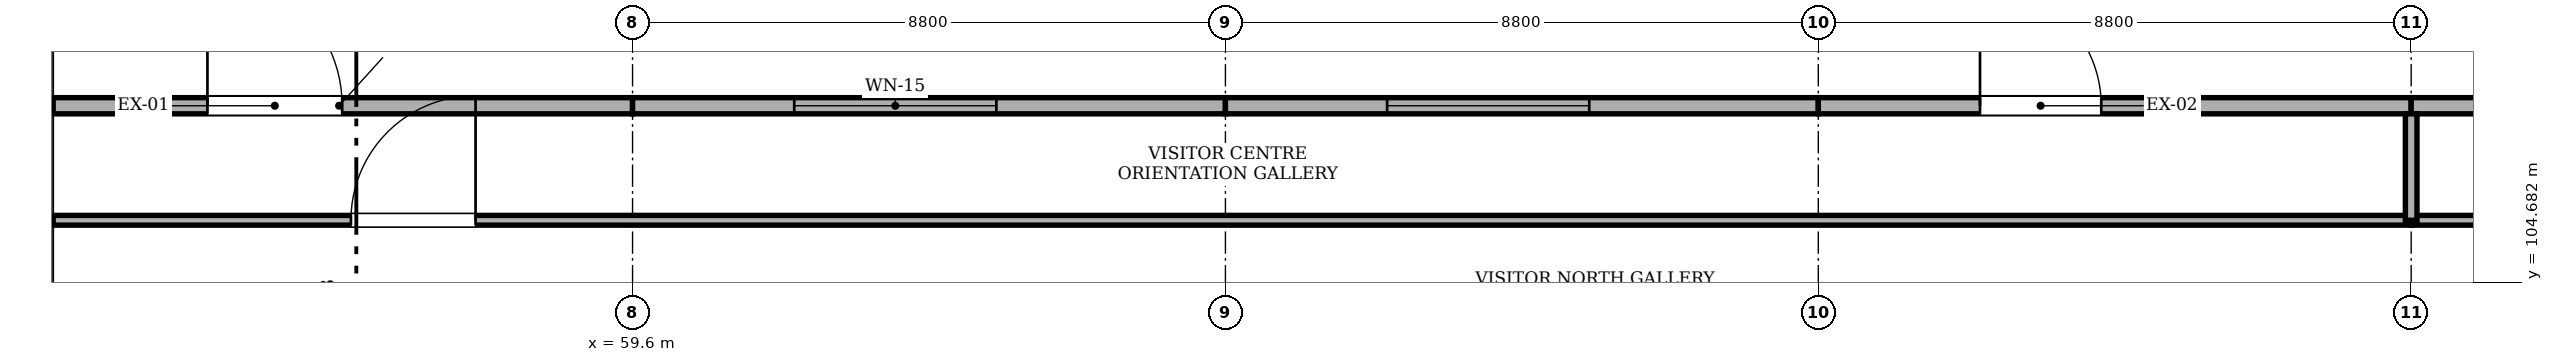
"""IFC4 building model, lengths in metres.
Left out: names, types, materials, properties, quantities, classifications, styles, units other than length and angle.
Written with IfcOpenShell. Run it as: python <this file> out.ifc"""

import sys

from ifc_helpers import new_model, si_unit, direction, frame, frame_2d, origin, place, context, subcontext, project, spatial, rectangle, extrude, element, fill, save


model = new_model("IFC4")
c1 = context("Model", 3, precision=1e-05, world=origin(), true_north=direction((0.0, 1.0)))
c2 = subcontext(c1, "Body", "Model", "MODEL_VIEW")
j1 = project(units=[si_unit("LENGTHUNIT", "METRE"), si_unit("PLANEANGLEUNIT", "RADIAN")], contexts=[c1])
p1 = place(None, origin())
s1 = spatial("IfcSite", under=j1, at=p1, CompositionType="ELEMENT")
p2 = place(p1, origin())
s2 = spatial("IfcBuilding", under=s1, at=p2, CompositionType="ELEMENT")
p3 = place(p2, origin())
s3 = spatial("IfcBuildingStorey", under=s2, at=p3, CompositionType="ELEMENT", Elevation=0.0)
p4 = place(p3, frame((50.89, 107.3, 0.0), z_axis=(0.0, 0.0, 1.0), x_axis=(1.0, 0.0, 0.0)))
e1 = element("IfcWall", 1, at=p4, inside=s3, PredefinedType="STANDARD", context=c2, shape_type="SweptSolid", body=[
    extrude(rectangle(XDim=8.71, YDim=0.24, at=frame_2d((4.355, 0.0))), origin(), (0.0, 0.0, 1.0), 5.18),
])
p5 = place(p4, frame((2.4, 0.0, 0.0)))
e2 = element("IfcOpeningElement", 2, at=p5, cuts=e1, PredefinedType="OPENING", context=c2, shape_type="SweptSolid", body=[
    extrude(rectangle(XDim=2.0, YDim=2.4, at=frame_2d((1.0, 1.2))), frame((0.0, 0.13, 0.0), z_axis=(0.0, -1.0, 0.0), x_axis=(1.0, 0.0, 0.0)), (0.0, 0.0, 1.0), 0.26),
])
p6 = place(p3, frame((59.6, 107.3, 0.0), z_axis=(0.0, 0.0, 1.0), x_axis=(1.0, 0.0, 0.0)))
e3 = element("IfcWall", 3, at=p6, inside=s3, PredefinedType="STANDARD", context=c2, shape_type="SweptSolid", body=[
    extrude(rectangle(XDim=8.8, YDim=0.24, at=frame_2d((4.4, 0.0))), origin(), (0.0, 0.0, 1.0), 5.18),
])
p7 = place(p6, frame((2.4, 0.0, 0.8)))
e4 = element("IfcOpeningElement", 4, at=p7, cuts=e3, PredefinedType="OPENING", context=c2, shape_type="SweptSolid", body=[
    extrude(rectangle(XDim=3.0, YDim=2.4, at=frame_2d((1.5, 1.2))), frame((0.0, 0.13, 0.0), z_axis=(0.0, -1.0, 0.0), x_axis=(1.0, 0.0, 0.0)), (0.0, 0.0, 1.0), 0.26),
])
p8 = place(p3, frame((68.4, 107.3, 0.0), z_axis=(0.0, 0.0, 1.0), x_axis=(1.0, 0.0, 0.0)))
e5 = element("IfcWall", 5, at=p8, inside=s3, PredefinedType="STANDARD", context=c2, shape_type="SweptSolid", body=[
    extrude(rectangle(XDim=8.8, YDim=0.24, at=frame_2d((4.4, 0.0))), origin(), (0.0, 0.0, 1.0), 5.18),
])
p9 = place(p8, frame((2.4, 0.0, 0.8)))
e6 = element("IfcOpeningElement", 6, at=p9, cuts=e5, PredefinedType="OPENING", context=c2, shape_type="SweptSolid", body=[
    extrude(rectangle(XDim=3.0, YDim=2.4, at=frame_2d((1.5, 1.2))), frame((0.0, 0.13, 0.0), z_axis=(0.0, -1.0, 0.0), x_axis=(1.0, 0.0, 0.0)), (0.0, 0.0, 1.0), 0.26),
])
p10 = place(p3, frame((77.2, 107.3, 0.0), z_axis=(0.0, 0.0, 1.0), x_axis=(1.0, 0.0, 0.0)))
e7 = element("IfcWall", 7, at=p10, inside=s3, PredefinedType="STANDARD", context=c2, shape_type="SweptSolid", body=[
    extrude(rectangle(XDim=8.8, YDim=0.24, at=frame_2d((4.4, 0.0))), origin(), (0.0, 0.0, 1.0), 5.18),
])
p11 = place(p10, frame((2.4, 0.0, 0.0)))
e8 = element("IfcOpeningElement", 8, at=p11, cuts=e7, PredefinedType="OPENING", context=c2, shape_type="SweptSolid", body=[
    extrude(rectangle(XDim=1.8, YDim=2.3, at=frame_2d((0.9, 1.15))), frame((0.0, 0.13, 0.0), z_axis=(0.0, -1.0, 0.0), x_axis=(1.0, 0.0, 0.0)), (0.0, 0.0, 1.0), 0.26),
])
p12 = place(p3, frame((86.0, 107.3, 0.0), z_axis=(0.0, 0.0, 1.0), x_axis=(1.0, 0.0, 0.0)))
e9 = element("IfcWall", 9, at=p12, inside=s3, PredefinedType="STANDARD", context=c2, shape_type="SweptSolid", body=[
    extrude(rectangle(XDim=8.8, YDim=0.24, at=frame_2d((4.4, 0.0))), origin(), (0.0, 0.0, 1.0), 5.18),
])
p13 = place(p12, frame((2.4, 0.0, 0.8)))
e10 = element("IfcOpeningElement", 10, at=p13, cuts=e9, PredefinedType="OPENING", context=c2, shape_type="SweptSolid", body=[
    extrude(rectangle(XDim=3.0, YDim=2.4, at=frame_2d((1.5, 1.2))), frame((0.0, 0.13, 0.0), z_axis=(0.0, -1.0, 0.0), x_axis=(1.0, 0.0, 0.0)), (0.0, 0.0, 1.0), 0.26),
])
p14 = place(p3, frame((50.92, 105.6, 0.0), z_axis=(0.0, 0.0, 1.0), x_axis=(1.0, 0.0, 0.0)))
e11 = element("IfcWall", 11, at=p14, inside=s3, PredefinedType="PARTITIONING", context=c2, shape_type="SweptSolid", body=[
    extrude(rectangle(XDim=35.08, YDim=0.145, at=frame_2d((17.54, 0.0))), origin(), (0.0, 0.0, 1.0), 5.18),
])
p15 = place(p14, frame((4.5, 0.0, 0.0)))
e12 = element("IfcOpeningElement", 12, at=p15, cuts=e11, PredefinedType="OPENING", context=c2, shape_type="SweptSolid", body=[
    extrude(rectangle(XDim=1.85, YDim=2.25, at=frame_2d((0.925, 1.125))), frame((0.0, 0.083, 0.0), z_axis=(0.0, -1.0, 0.0), x_axis=(1.0, 0.0, 0.0)), (0.0, 0.0, 1.0), 0.165),
])
p16 = place(p3, frame((86.0, 105.6, 0.0), z_axis=(0.0, 0.0, 1.0), x_axis=(1.0, 0.0, 0.0)))
e13 = element("IfcWall", 13, at=p16, inside=s3, PredefinedType="PARTITIONING", context=c2, shape_type="SweptSolid", body=[
    extrude(rectangle(XDim=35.02, YDim=0.145, at=frame_2d((17.51, 0.0))), origin(), (0.0, 0.0, 1.0), 5.18),
])
p17 = place(p16, frame((4.5, 0.0, 0.0)))
e14 = element("IfcOpeningElement", 14, at=p17, cuts=e13, PredefinedType="OPENING", context=c2, shape_type="SweptSolid", body=[
    extrude(rectangle(XDim=1.85, YDim=2.25, at=frame_2d((0.925, 1.125))), frame((0.0, 0.083, 0.0), z_axis=(0.0, -1.0, 0.0), x_axis=(1.0, 0.0, 0.0)), (0.0, 0.0, 1.0), 0.165),
])
p18 = place(p3, frame((86.0, 105.6, 0.0), z_axis=(0.0, 0.0, 1.0), x_axis=(0.0, 1.0, 0.0)))
e15 = element("IfcWall", 15, at=p18, inside=s3, PredefinedType="PARTITIONING", context=c2, shape_type="SweptSolid", body=[
    extrude(rectangle(XDim=1.58, YDim=0.172, at=frame_2d((0.79, 0.0))), origin(), (0.0, 0.0, 1.0), 4.53),
])
p19 = place(p5, origin())
e16 = element("IfcDoor", 16, at=p19, inside=s3, OperationType="SINGLE_SWING_LEFT", PredefinedType="DOOR", context=c2, shape_type="SweptSolid", body=[
    extrude(rectangle(XDim=2.0, YDim=2.4, at=frame_2d((1.0, 1.2))), frame((0.0, 0.025, 0.0), z_axis=(0.0, -1.0, 0.0), x_axis=(1.0, 0.0, 0.0)), (0.0, 0.0, 1.0), 0.05),
])
fill(e2, e16)
p20 = place(p7, origin())
e17 = element("IfcWindow", 17, at=p20, inside=s3, PartitioningType="TRIPLE_PANEL_VERTICAL", PredefinedType="WINDOW", context=c2, shape_type="SweptSolid", body=[
    extrude(rectangle(XDim=3.0, YDim=2.4, at=frame_2d((1.5, 1.2))), frame((0.0, 0.03, 0.0), z_axis=(0.0, -1.0, 0.0), x_axis=(1.0, 0.0, 0.0)), (0.0, 0.0, 1.0), 0.06),
])
fill(e4, e17)
p21 = place(p9, origin())
e18 = element("IfcWindow", 18, at=p21, inside=s3, PartitioningType="TRIPLE_PANEL_VERTICAL", PredefinedType="WINDOW", context=c2, shape_type="SweptSolid", body=[
    extrude(rectangle(XDim=3.0, YDim=2.4, at=frame_2d((1.5, 1.2))), frame((0.0, 0.03, 0.0), z_axis=(0.0, -1.0, 0.0), x_axis=(1.0, 0.0, 0.0)), (0.0, 0.0, 1.0), 0.06),
])
fill(e6, e18)
p22 = place(p11, origin())
e19 = element("IfcDoor", 19, at=p22, inside=s3, OperationType="SINGLE_SWING_LEFT", PredefinedType="DOOR", context=c2, shape_type="SweptSolid", body=[
    extrude(rectangle(XDim=1.8, YDim=2.3, at=frame_2d((0.9, 1.15))), frame((0.0, 0.025, 0.0), z_axis=(0.0, -1.0, 0.0), x_axis=(1.0, 0.0, 0.0)), (0.0, 0.0, 1.0), 0.05),
])
fill(e8, e19)
p23 = place(p15, origin())
e20 = element("IfcDoor", 20, at=p23, inside=s3, OperationType="SINGLE_SWING_RIGHT", PredefinedType="DOOR", context=c2, shape_type="SweptSolid", body=[
    extrude(rectangle(XDim=1.85, YDim=2.25, at=frame_2d((0.925, 1.125))), frame((0.0, 0.025, 0.0), z_axis=(0.0, -1.0, 0.0), x_axis=(1.0, 0.0, 0.0)), (0.0, 0.0, 1.0), 0.05),
])
fill(e12, e20)
save(model, sys.argv[1])
